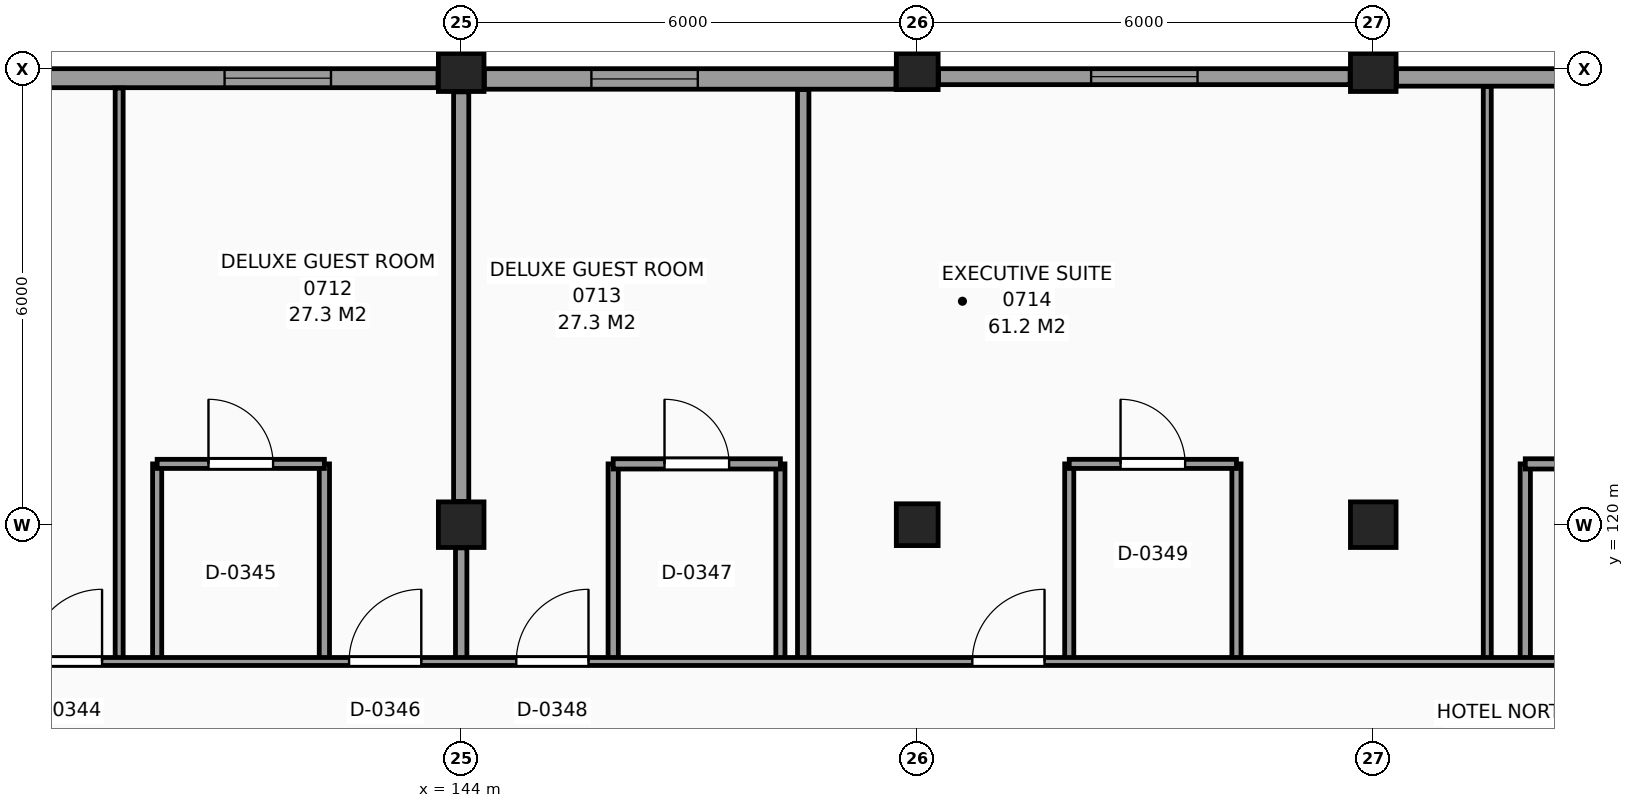
"""IFC4 building model, lengths in metres.
Left out: names, types, materials, properties, quantities, classifications, styles, units other than length and angle.
Written with IfcOpenShell. Run it as: python <this file> out.ifc"""

import sys

from ifc_helpers import new_model, si_unit, direction, frame, frame_2d, origin, origin_2d, place, context, subcontext, project, spatial, rectangle, extrude, element, fill, save


model = new_model("IFC4")
c1 = context("Model", 3, precision=1e-05, world=origin(), true_north=direction((0.0, 1.0)))
c2 = subcontext(c1, "Body", "Model", "MODEL_VIEW")
j1 = project(units=[si_unit("LENGTHUNIT", "METRE"), si_unit("PLANEANGLEUNIT", "RADIAN")], contexts=[c1])
p1 = place(None, origin())
s1 = spatial("IfcSite", under=j1, at=p1, CompositionType="ELEMENT")
p2 = place(p1, origin())
s2 = spatial("IfcBuilding", under=s1, at=p2, CompositionType="ELEMENT")
p3 = place(p2, frame((0.0, 0.0, 31.5)))
s3 = spatial("IfcBuildingStorey", under=s2, at=p3, CompositionType="ELEMENT", Elevation=31.5)
for number, where, z_axis, x_axis in (
    (1, (144.0, 120.0, 0.0), (0.0, 0.0, 1.0), (1.0, 0.0, 0.0)),
    (2, (144.0, 126.0, 0.0), (0.0, 0.0, 1.0), (1.0, 0.0, 0.0)),
):
    element("IfcColumn", number, at=place(p3, frame(where, z_axis=z_axis, x_axis=x_axis)), inside=s3, PredefinedType="COLUMN", context=c2, shape_type="SweptSolid", body=[
        extrude(rectangle(XDim=0.6, YDim=0.6, at=origin_2d()), origin(), (0.0, 0.0, 1.0), 3.3),
    ])
for number, where, z_axis, x_axis in (
    (3, (150.0, 120.0, 0.0), (0.0, 0.0, 1.0), (1.0, 0.0, 0.0)),
    (4, (150.0, 126.0, 0.0), (0.0, 0.0, 1.0), (1.0, 0.0, 0.0)),
):
    element("IfcColumn", number, at=place(p3, frame(where, z_axis=z_axis, x_axis=x_axis)), inside=s3, PredefinedType="COLUMN", context=c2, shape_type="SweptSolid", body=[
        extrude(rectangle(XDim=0.55, YDim=0.55, at=origin_2d()), origin(), (0.0, 0.0, 1.0), 3.3),
    ])
for number, where, z_axis, x_axis in (
    (5, (156.0, 120.0, 0.0), (0.0, 0.0, 1.0), (1.0, 0.0, 0.0)),
    (6, (156.0, 126.0, 0.0), (0.0, 0.0, 1.0), (1.0, 0.0, 0.0)),
):
    element("IfcColumn", number, at=place(p3, frame(where, z_axis=z_axis, x_axis=x_axis)), inside=s3, PredefinedType="COLUMN", context=c2, shape_type="SweptSolid", body=[
        extrude(rectangle(XDim=0.6, YDim=0.6, at=origin_2d()), origin(), (0.0, 0.0, 1.0), 3.3),
    ])
p4 = place(p3, frame((161.72, 125.885, 0.0), z_axis=(0.0, 0.0, 1.0), x_axis=(-1.0, 0.0, 0.0)))
e7 = element("IfcWall", 7, at=p4, inside=s3, PredefinedType="SOLIDWALL", context=c2, shape_type="SweptSolid", body=[
    extrude(rectangle(XDim=5.415, YDim=0.23, at=frame_2d((2.708, 0.0))), origin(), (0.0, 0.0, 1.0), 2.42),
])
p5 = place(p3, frame((155.695, 125.895, 0.0), z_axis=(0.0, 0.0, 1.0), x_axis=(-1.0, 0.0, 0.0)))
e8 = element("IfcWall", 8, at=p5, inside=s3, PredefinedType="SOLIDWALL", context=c2, shape_type="SweptSolid", body=[
    extrude(rectangle(XDim=5.415, YDim=0.21, at=frame_2d((2.708, 0.0))), origin(), (0.0, 0.0, 1.0), 2.42),
])
p6 = place(p5, frame((2.007, 0.0, 0.8)))
e9 = element("IfcOpeningElement", 9, at=p6, cuts=e8, PredefinedType="OPENING", context=c2, shape_type="SweptSolid", body=[
    extrude(rectangle(XDim=1.4, YDim=1.4, at=frame_2d((0.7, 0.7))), frame((0.0, 0.115, 0.0), z_axis=(0.0, -1.0, 0.0), x_axis=(1.0, 0.0, 0.0)), (0.0, 0.0, 1.0), 0.23),
])
p7 = place(p3, frame((149.72, 125.865, 0.0), z_axis=(0.0, 0.0, 1.0), x_axis=(-1.0, 0.0, 0.0)))
e10 = element("IfcWall", 10, at=p7, inside=s3, PredefinedType="SOLIDWALL", context=c2, shape_type="SweptSolid", body=[
    extrude(rectangle(XDim=5.415, YDim=0.27, at=frame_2d((2.708, 0.0))), origin(), (0.0, 0.0, 1.0), 2.42),
])
p8 = place(p7, frame((2.607, 0.0, 0.8)))
e11 = element("IfcOpeningElement", 11, at=p8, cuts=e10, PredefinedType="OPENING", context=c2, shape_type="SweptSolid", body=[
    extrude(rectangle(XDim=1.4, YDim=1.4, at=frame_2d((0.7, 0.7))), frame((0.0, 0.145, 0.0), z_axis=(0.0, -1.0, 0.0), x_axis=(1.0, 0.0, 0.0)), (0.0, 0.0, 1.0), 0.29),
])
p9 = place(p3, frame((143.695, 125.875, 0.0), z_axis=(0.0, 0.0, 1.0), x_axis=(-1.0, 0.0, 0.0)))
e12 = element("IfcWall", 12, at=p9, inside=s3, PredefinedType="SOLIDWALL", context=c2, shape_type="SweptSolid", body=[
    extrude(rectangle(XDim=5.415, YDim=0.25, at=frame_2d((2.708, 0.0))), origin(), (0.0, 0.0, 1.0), 2.42),
])
p10 = place(p9, frame((1.408, 0.0, 0.8)))
e13 = element("IfcOpeningElement", 13, at=p10, cuts=e12, PredefinedType="OPENING", context=c2, shape_type="SweptSolid", body=[
    extrude(rectangle(XDim=1.4, YDim=1.4, at=frame_2d((0.7, 0.7))), frame((0.0, 0.135, 0.0), z_axis=(0.0, -1.0, 0.0), x_axis=(1.0, 0.0, 0.0)), (0.0, 0.0, 1.0), 0.27),
])
p11 = place(p3, frame((139.5, 118.2, 0.0), z_axis=(0.0, 0.0, 1.0), x_axis=(0.0, 1.0, 0.0)))
e14 = element("IfcWall", 14, at=p11, inside=s3, PredefinedType="PARTITIONING", context=c2, shape_type="SweptSolid", body=[
    extrude(rectangle(XDim=7.545, YDim=0.105, at=frame_2d((3.772, 0.0))), origin(), (0.0, 0.0, 1.0), 3.07),
])
p12 = place(p3, frame((140.0, 118.2, 0.0), z_axis=(0.0, 0.0, 1.0), x_axis=(0.0, 1.0, 0.0)))
e15 = element("IfcWall", 15, at=p12, inside=s3, PredefinedType="PARTITIONING", context=c2, shape_type="SweptSolid", body=[
    extrude(rectangle(XDim=2.6, YDim=0.12, at=frame_2d((1.3, 0.0))), origin(), (0.0, 0.0, 1.0), 3.07),
])
p13 = place(p3, frame((142.2, 118.2, 0.0), z_axis=(0.0, 0.0, 1.0), x_axis=(0.0, 1.0, 0.0)))
e16 = element("IfcWall", 16, at=p13, inside=s3, PredefinedType="PARTITIONING", context=c2, shape_type="SweptSolid", body=[
    extrude(rectangle(XDim=2.6, YDim=0.135, at=frame_2d((1.3, 0.0))), origin(), (0.0, 0.0, 1.0), 3.07),
])
p14 = place(p3, frame((144.0, 118.2, 0.0), z_axis=(0.0, 0.0, 1.0), x_axis=(0.0, 1.0, 0.0)))
e17 = element("IfcWall", 17, at=p14, inside=s3, PredefinedType="PARTITIONING", context=c2, shape_type="SweptSolid", body=[
    extrude(rectangle(XDim=1.495, YDim=0.15, at=frame_2d((0.748, 0.0))), origin(), (0.0, 0.0, 1.0), 2.52),
])
p15 = place(p3, frame((144.0, 120.305, 0.0), z_axis=(0.0, 0.0, 1.0), x_axis=(0.0, 1.0, 0.0)))
e18 = element("IfcWall", 18, at=p15, inside=s3, PredefinedType="PARTITIONING", context=c2, shape_type="SweptSolid", body=[
    extrude(rectangle(XDim=5.39, YDim=0.2, at=frame_2d((2.695, 0.0))), origin(), (0.0, 0.0, 1.0), 2.57),
])
p16 = place(p3, frame((146.0, 118.2, 0.0), z_axis=(0.0, 0.0, 1.0), x_axis=(0.0, 1.0, 0.0)))
e19 = element("IfcWall", 19, at=p16, inside=s3, PredefinedType="PARTITIONING", context=c2, shape_type="SweptSolid", body=[
    extrude(rectangle(XDim=2.6, YDim=0.135, at=frame_2d((1.3, 0.0))), origin(), (0.0, 0.0, 1.0), 3.07),
])
p17 = place(p3, frame((148.2, 118.2, 0.0), z_axis=(0.0, 0.0, 1.0), x_axis=(0.0, 1.0, 0.0)))
e20 = element("IfcWall", 20, at=p17, inside=s3, PredefinedType="PARTITIONING", context=c2, shape_type="SweptSolid", body=[
    extrude(rectangle(XDim=2.6, YDim=0.12, at=frame_2d((1.3, 0.0))), origin(), (0.0, 0.0, 1.0), 3.07),
])
p18 = place(p3, frame((148.5, 118.2, 0.0), z_axis=(0.0, 0.0, 1.0), x_axis=(0.0, 1.0, 0.0)))
e21 = element("IfcWall", 21, at=p18, inside=s3, PredefinedType="PARTITIONING", context=c2, shape_type="SweptSolid", body=[
    extrude(rectangle(XDim=7.525, YDim=0.15, at=frame_2d((3.763, 0.0))), origin(), (0.0, 0.0, 1.0), 3.07),
])
for number, where, z_axis, x_axis in (
    (22, (152.0, 118.2, 0.0), (0.0, 0.0, 1.0), (0.0, 1.0, 0.0)),
    (23, (154.2, 118.2, 0.0), (0.0, 0.0, 1.0), (0.0, 1.0, 0.0)),
):
    element("IfcWall", number, at=place(p3, frame(where, z_axis=z_axis, x_axis=x_axis)), inside=s3, PredefinedType="PARTITIONING", context=c2, shape_type="SweptSolid", body=[
        extrude(rectangle(XDim=2.6, YDim=0.12, at=frame_2d((1.3, 0.0))), origin(), (0.0, 0.0, 1.0), 3.07),
    ])
p19 = place(p3, frame((157.5, 118.2, 0.0), z_axis=(0.0, 0.0, 1.0), x_axis=(0.0, 1.0, 0.0)))
e24 = element("IfcWall", 24, at=p19, inside=s3, PredefinedType="PARTITIONING", context=c2, shape_type="SweptSolid", body=[
    extrude(rectangle(XDim=7.565, YDim=0.105, at=frame_2d((3.782, 0.0))), origin(), (0.0, 0.0, 1.0), 3.07),
])
p20 = place(p3, frame((158.0, 118.2, 0.0), z_axis=(0.0, 0.0, 1.0), x_axis=(0.0, 1.0, 0.0)))
e25 = element("IfcWall", 25, at=p20, inside=s3, PredefinedType="PARTITIONING", context=c2, shape_type="SweptSolid", body=[
    extrude(rectangle(XDim=2.6, YDim=0.135, at=frame_2d((1.3, 0.0))), origin(), (0.0, 0.0, 1.0), 3.07),
])
p21 = place(p3, frame((66.215, 118.2, 0.0), z_axis=(0.0, 0.0, 1.0), x_axis=(1.0, 0.0, 0.0)))
e26 = element("IfcWall", 26, at=p21, inside=s3, PredefinedType="PARTITIONING", context=c2, shape_type="SweptSolid", body=[
    extrude(rectangle(XDim=110.285, YDim=0.105, at=frame_2d((55.143, 0.0))), origin(), (0.0, 0.0, 1.0), 3.07),
])
p22 = place(p21, frame((8.36, 0.0, 0.0)))
e27 = element("IfcOpeningElement", 27, at=p22, cuts=e26, PredefinedType="OPENING", context=c2, shape_type="SweptSolid", body=[
    extrude(rectangle(XDim=0.95, YDim=2.1, at=frame_2d((0.475, 1.05))), frame((0.0, 0.062, 0.0), z_axis=(0.0, -1.0, 0.0), x_axis=(1.0, 0.0, 0.0)), (0.0, 0.0, 1.0), 0.125),
])
p23 = place(p21, frame((12.51, 0.0, 0.0)))
e28 = element("IfcOpeningElement", 28, at=p23, cuts=e26, PredefinedType="OPENING", context=c2, shape_type="SweptSolid", body=[
    extrude(rectangle(XDim=0.95, YDim=2.1, at=frame_2d((0.475, 1.05))), frame((0.0, 0.062, 0.0), z_axis=(0.0, -1.0, 0.0), x_axis=(1.0, 0.0, 0.0)), (0.0, 0.0, 1.0), 0.125),
])
p24 = place(p21, frame((16.91, 0.0, 0.0)))
e29 = element("IfcOpeningElement", 29, at=p24, cuts=e26, PredefinedType="OPENING", context=c2, shape_type="SweptSolid", body=[
    extrude(rectangle(XDim=0.95, YDim=2.1, at=frame_2d((0.475, 1.05))), frame((0.0, 0.062, 0.0), z_axis=(0.0, -1.0, 0.0), x_axis=(1.0, 0.0, 0.0)), (0.0, 0.0, 1.0), 0.125),
])
p25 = place(p21, frame((21.41, 0.0, 0.0)))
e30 = element("IfcOpeningElement", 30, at=p25, cuts=e26, PredefinedType="OPENING", context=c2, shape_type="SweptSolid", body=[
    extrude(rectangle(XDim=0.95, YDim=2.1, at=frame_2d((0.475, 1.05))), frame((0.0, 0.062, 0.0), z_axis=(0.0, -1.0, 0.0), x_axis=(1.0, 0.0, 0.0)), (0.0, 0.0, 1.0), 0.125),
])
p26 = place(p21, frame((30.51, 0.0, 0.0)))
e31 = element("IfcOpeningElement", 31, at=p26, cuts=e26, PredefinedType="OPENING", context=c2, shape_type="SweptSolid", body=[
    extrude(rectangle(XDim=0.95, YDim=2.1, at=frame_2d((0.475, 1.05))), frame((0.0, 0.062, 0.0), z_axis=(0.0, -1.0, 0.0), x_axis=(1.0, 0.0, 0.0)), (0.0, 0.0, 1.0), 0.125),
])
p27 = place(p21, frame((34.91, 0.0, 0.0)))
e32 = element("IfcOpeningElement", 32, at=p27, cuts=e26, PredefinedType="OPENING", context=c2, shape_type="SweptSolid", body=[
    extrude(rectangle(XDim=0.95, YDim=2.1, at=frame_2d((0.475, 1.05))), frame((0.0, 0.062, 0.0), z_axis=(0.0, -1.0, 0.0), x_axis=(1.0, 0.0, 0.0)), (0.0, 0.0, 1.0), 0.125),
])
p28 = place(p21, frame((42.11, 0.0, 0.0)))
e33 = element("IfcOpeningElement", 33, at=p28, cuts=e26, PredefinedType="OPENING", context=c2, shape_type="SweptSolid", body=[
    extrude(rectangle(XDim=0.95, YDim=2.1, at=frame_2d((0.475, 1.05))), frame((0.0, 0.062, 0.0), z_axis=(0.0, -1.0, 0.0), x_axis=(1.0, 0.0, 0.0)), (0.0, 0.0, 1.0), 0.125),
])
p29 = place(p21, frame((50.36, 0.0, 0.0)))
e34 = element("IfcOpeningElement", 34, at=p29, cuts=e26, PredefinedType="OPENING", context=c2, shape_type="SweptSolid", body=[
    extrude(rectangle(XDim=0.95, YDim=2.1, at=frame_2d((0.475, 1.05))), frame((0.0, 0.062, 0.0), z_axis=(0.0, -1.0, 0.0), x_axis=(1.0, 0.0, 0.0)), (0.0, 0.0, 1.0), 0.125),
])
p30 = place(p21, frame((62.36, 0.0, 0.0)))
e35 = element("IfcOpeningElement", 35, at=p30, cuts=e26, PredefinedType="OPENING", context=c2, shape_type="SweptSolid", body=[
    extrude(rectangle(XDim=0.95, YDim=2.1, at=frame_2d((0.475, 1.05))), frame((0.0, 0.062, 0.0), z_axis=(0.0, -1.0, 0.0), x_axis=(1.0, 0.0, 0.0)), (0.0, 0.0, 1.0), 0.125),
])
p31 = place(p21, frame((64.91, 0.0, 0.0)))
e36 = element("IfcOpeningElement", 36, at=p31, cuts=e26, PredefinedType="OPENING", context=c2, shape_type="SweptSolid", body=[
    extrude(rectangle(XDim=0.95, YDim=2.1, at=frame_2d((0.475, 1.05))), frame((0.0, 0.062, 0.0), z_axis=(0.0, -1.0, 0.0), x_axis=(1.0, 0.0, 0.0)), (0.0, 0.0, 1.0), 0.125),
])
p32 = place(p21, frame((72.11, 0.0, 0.0)))
e37 = element("IfcOpeningElement", 37, at=p32, cuts=e26, PredefinedType="OPENING", context=c2, shape_type="SweptSolid", body=[
    extrude(rectangle(XDim=0.95, YDim=2.1, at=frame_2d((0.475, 1.05))), frame((0.0, 0.062, 0.0), z_axis=(0.0, -1.0, 0.0), x_axis=(1.0, 0.0, 0.0)), (0.0, 0.0, 1.0), 0.125),
])
p33 = place(p21, frame((76.31, 0.0, 0.0)))
e38 = element("IfcOpeningElement", 38, at=p33, cuts=e26, PredefinedType="OPENING", context=c2, shape_type="SweptSolid", body=[
    extrude(rectangle(XDim=0.95, YDim=2.1, at=frame_2d((0.475, 1.05))), frame((0.0, 0.062, 0.0), z_axis=(0.0, -1.0, 0.0), x_axis=(1.0, 0.0, 0.0)), (0.0, 0.0, 1.0), 0.125),
])
p34 = place(p21, frame((78.51, 0.0, 0.0)))
e39 = element("IfcOpeningElement", 39, at=p34, cuts=e26, PredefinedType="OPENING", context=c2, shape_type="SweptSolid", body=[
    extrude(rectangle(XDim=0.95, YDim=2.1, at=frame_2d((0.475, 1.05))), frame((0.0, 0.062, 0.0), z_axis=(0.0, -1.0, 0.0), x_axis=(1.0, 0.0, 0.0)), (0.0, 0.0, 1.0), 0.125),
])
p35 = place(p21, frame((84.51, 0.0, 0.0)))
e40 = element("IfcOpeningElement", 40, at=p35, cuts=e26, PredefinedType="OPENING", context=c2, shape_type="SweptSolid", body=[
    extrude(rectangle(XDim=0.95, YDim=2.1, at=frame_2d((0.475, 1.05))), frame((0.0, 0.062, 0.0), z_axis=(0.0, -1.0, 0.0), x_axis=(1.0, 0.0, 0.0)), (0.0, 0.0, 1.0), 0.125),
])
p36 = place(p21, frame((98.36, 0.0, 0.0)))
e41 = element("IfcOpeningElement", 41, at=p36, cuts=e26, PredefinedType="OPENING", context=c2, shape_type="SweptSolid", body=[
    extrude(rectangle(XDim=0.95, YDim=2.1, at=frame_2d((0.475, 1.05))), frame((0.0, 0.062, 0.0), z_axis=(0.0, -1.0, 0.0), x_axis=(1.0, 0.0, 0.0)), (0.0, 0.0, 1.0), 0.125),
])
p37 = place(p21, frame((104.26, 0.0, 0.0)))
e42 = element("IfcOpeningElement", 42, at=p37, cuts=e26, PredefinedType="OPENING", context=c2, shape_type="SweptSolid", body=[
    extrude(rectangle(XDim=0.95, YDim=2.1, at=frame_2d((0.475, 1.05))), frame((0.0, 0.062, 0.0), z_axis=(0.0, -1.0, 0.0), x_axis=(1.0, 0.0, 0.0)), (0.0, 0.0, 1.0), 0.125),
])
p38 = place(p3, frame((140.0, 120.8, 0.0), z_axis=(0.0, 0.0, 1.0), x_axis=(1.0, 0.0, 0.0)))
e43 = element("IfcWall", 43, at=p38, inside=s3, PredefinedType="PARTITIONING", context=c2, shape_type="SweptSolid", body=[
    extrude(rectangle(XDim=2.2, YDim=0.12, at=frame_2d((1.1, 0.0))), origin(), (0.0, 0.0, 1.0), 3.07),
])
p39 = place(p38, frame((0.675, 0.0, 0.0)))
e44 = element("IfcOpeningElement", 44, at=p39, cuts=e43, PredefinedType="OPENING", context=c2, shape_type="SweptSolid", body=[
    extrude(rectangle(XDim=0.85, YDim=2.1, at=frame_2d((0.425, 1.05))), frame((0.0, 0.07, 0.0), z_axis=(0.0, -1.0, 0.0), x_axis=(1.0, 0.0, 0.0)), (0.0, 0.0, 1.0), 0.14),
])
p40 = place(p3, frame((146.0, 120.8, 0.0), z_axis=(0.0, 0.0, 1.0), x_axis=(1.0, 0.0, 0.0)))
e45 = element("IfcWall", 45, at=p40, inside=s3, PredefinedType="PARTITIONING", context=c2, shape_type="SweptSolid", body=[
    extrude(rectangle(XDim=2.2, YDim=0.135, at=frame_2d((1.1, 0.0))), origin(), (0.0, 0.0, 1.0), 3.07),
])
p41 = place(p40, frame((0.675, 0.0, 0.0)))
e46 = element("IfcOpeningElement", 46, at=p41, cuts=e45, PredefinedType="OPENING", context=c2, shape_type="SweptSolid", body=[
    extrude(rectangle(XDim=0.85, YDim=2.1, at=frame_2d((0.425, 1.05))), frame((0.0, 0.078, 0.0), z_axis=(0.0, -1.0, 0.0), x_axis=(1.0, 0.0, 0.0)), (0.0, 0.0, 1.0), 0.155),
])
p42 = place(p3, frame((152.0, 120.8, 0.0), z_axis=(0.0, 0.0, 1.0), x_axis=(1.0, 0.0, 0.0)))
e47 = element("IfcWall", 47, at=p42, inside=s3, PredefinedType="PARTITIONING", context=c2, shape_type="SweptSolid", body=[
    extrude(rectangle(XDim=2.2, YDim=0.12, at=frame_2d((1.1, 0.0))), origin(), (0.0, 0.0, 1.0), 3.07),
])
p43 = place(p42, frame((0.675, 0.0, 0.0)))
e48 = element("IfcOpeningElement", 48, at=p43, cuts=e47, PredefinedType="OPENING", context=c2, shape_type="SweptSolid", body=[
    extrude(rectangle(XDim=0.85, YDim=2.1, at=frame_2d((0.425, 1.05))), frame((0.0, 0.07, 0.0), z_axis=(0.0, -1.0, 0.0), x_axis=(1.0, 0.0, 0.0)), (0.0, 0.0, 1.0), 0.14),
])
p44 = place(p3, frame((158.0, 120.8, 0.0), z_axis=(0.0, 0.0, 1.0), x_axis=(1.0, 0.0, 0.0)))
e49 = element("IfcWall", 49, at=p44, inside=s3, PredefinedType="PARTITIONING", context=c2, shape_type="SweptSolid", body=[
    extrude(rectangle(XDim=2.2, YDim=0.135, at=frame_2d((1.1, 0.0))), origin(), (0.0, 0.0, 1.0), 3.07),
])
p45 = place(p44, frame((0.675, 0.0, 0.0)))
e50 = element("IfcOpeningElement", 50, at=p45, cuts=e49, PredefinedType="OPENING", context=c2, shape_type="SweptSolid", body=[
    extrude(rectangle(XDim=0.85, YDim=2.1, at=frame_2d((0.425, 1.05))), frame((0.0, 0.078, 0.0), z_axis=(0.0, -1.0, 0.0), x_axis=(1.0, 0.0, 0.0)), (0.0, 0.0, 1.0), 0.155),
])
p46 = place(p10, origin())
e51 = element("IfcWindow", 51, at=p46, inside=s3, PartitioningType="SINGLE_PANEL", PredefinedType="WINDOW", context=c2, shape_type="SweptSolid", body=[
    extrude(rectangle(XDim=1.4, YDim=1.4, at=frame_2d((0.7, 0.7))), frame((0.0, 0.03, 0.0), z_axis=(0.0, -1.0, 0.0), x_axis=(1.0, 0.0, 0.0)), (0.0, 0.0, 1.0), 0.06),
])
fill(e13, e51)
p47 = place(p8, origin())
e52 = element("IfcWindow", 52, at=p47, inside=s3, PartitioningType="SINGLE_PANEL", PredefinedType="WINDOW", context=c2, shape_type="SweptSolid", body=[
    extrude(rectangle(XDim=1.4, YDim=1.4, at=frame_2d((0.7, 0.7))), frame((0.0, 0.03, 0.0), z_axis=(0.0, -1.0, 0.0), x_axis=(1.0, 0.0, 0.0)), (0.0, 0.0, 1.0), 0.06),
])
fill(e11, e52)
p48 = place(p6, origin())
e53 = element("IfcWindow", 53, at=p48, inside=s3, PartitioningType="SINGLE_PANEL", PredefinedType="WINDOW", context=c2, shape_type="SweptSolid", body=[
    extrude(rectangle(XDim=1.4, YDim=1.4, at=frame_2d((0.7, 0.7))), frame((0.0, 0.03, 0.0), z_axis=(0.0, -1.0, 0.0), x_axis=(1.0, 0.0, 0.0)), (0.0, 0.0, 1.0), 0.06),
])
fill(e9, e53)
p49 = place(p32, origin())
e54 = element("IfcDoor", 54, at=p49, inside=s3, OperationType="SINGLE_SWING_RIGHT", PredefinedType="DOOR", context=c2, shape_type="SweptSolid", body=[
    extrude(rectangle(XDim=0.95, YDim=2.1, at=frame_2d((0.475, 1.05))), frame((0.0, 0.025, 0.0), z_axis=(0.0, -1.0, 0.0), x_axis=(1.0, 0.0, 0.0)), (0.0, 0.0, 1.0), 0.05),
])
fill(e37, e54)
p50 = place(p39, origin())
e55 = element("IfcDoor", 55, at=p50, inside=s3, OperationType="SINGLE_SWING_LEFT", PredefinedType="DOOR", context=c2, shape_type="SweptSolid", body=[
    extrude(rectangle(XDim=0.85, YDim=2.1, at=frame_2d((0.425, 1.05))), frame((0.0, 0.025, 0.0), z_axis=(0.0, -1.0, 0.0), x_axis=(1.0, 0.0, 0.0)), (0.0, 0.0, 1.0), 0.05),
])
fill(e44, e55)
p51 = place(p33, origin())
e56 = element("IfcDoor", 56, at=p51, inside=s3, OperationType="SINGLE_SWING_RIGHT", PredefinedType="DOOR", context=c2, shape_type="SweptSolid", body=[
    extrude(rectangle(XDim=0.95, YDim=2.1, at=frame_2d((0.475, 1.05))), frame((0.0, 0.025, 0.0), z_axis=(0.0, -1.0, 0.0), x_axis=(1.0, 0.0, 0.0)), (0.0, 0.0, 1.0), 0.05),
])
fill(e38, e56)
p52 = place(p41, origin())
e57 = element("IfcDoor", 57, at=p52, inside=s3, OperationType="SINGLE_SWING_LEFT", PredefinedType="DOOR", context=c2, shape_type="SweptSolid", body=[
    extrude(rectangle(XDim=0.85, YDim=2.1, at=frame_2d((0.425, 1.05))), frame((0.0, 0.025, 0.0), z_axis=(0.0, -1.0, 0.0), x_axis=(1.0, 0.0, 0.0)), (0.0, 0.0, 1.0), 0.05),
])
fill(e46, e57)
p53 = place(p34, origin())
e58 = element("IfcDoor", 58, at=p53, inside=s3, OperationType="SINGLE_SWING_RIGHT", PredefinedType="DOOR", context=c2, shape_type="SweptSolid", body=[
    extrude(rectangle(XDim=0.95, YDim=2.1, at=frame_2d((0.475, 1.05))), frame((0.0, 0.025, 0.0), z_axis=(0.0, -1.0, 0.0), x_axis=(1.0, 0.0, 0.0)), (0.0, 0.0, 1.0), 0.05),
])
fill(e39, e58)
p54 = place(p43, origin())
e59 = element("IfcDoor", 59, at=p54, inside=s3, OperationType="SINGLE_SWING_LEFT", PredefinedType="DOOR", context=c2, shape_type="SweptSolid", body=[
    extrude(rectangle(XDim=0.85, YDim=2.1, at=frame_2d((0.425, 1.05))), frame((0.0, 0.025, 0.0), z_axis=(0.0, -1.0, 0.0), x_axis=(1.0, 0.0, 0.0)), (0.0, 0.0, 1.0), 0.05),
])
fill(e48, e59)
p55 = place(p35, origin())
e60 = element("IfcDoor", 60, at=p55, inside=s3, OperationType="SINGLE_SWING_RIGHT", PredefinedType="DOOR", context=c2, shape_type="SweptSolid", body=[
    extrude(rectangle(XDim=0.95, YDim=2.1, at=frame_2d((0.475, 1.05))), frame((0.0, 0.025, 0.0), z_axis=(0.0, -1.0, 0.0), x_axis=(1.0, 0.0, 0.0)), (0.0, 0.0, 1.0), 0.05),
])
fill(e40, e60)
save(model, sys.argv[1])
